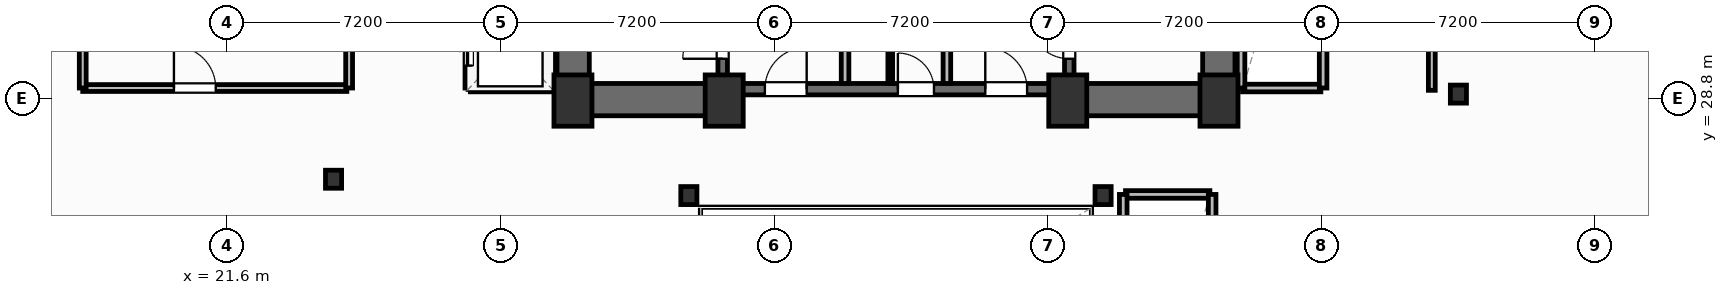
"""IFC4 building model, lengths in metres.
Left out: names, types, materials, properties, quantities, classifications, styles, units other than length and angle.
Written with IfcOpenShell. Run it as: python <this file> out.ifc"""

import sys

from ifc_helpers import new_model, si_unit, direction, frame, frame_2d, origin, origin_2d, place, context, subcontext, project, spatial, rectangle, i_section, extrude, element, fill, save


model = new_model("IFC4")
c1 = context("Model", 3, precision=1e-05, world=origin(), true_north=direction((0.0, 1.0)))
c2 = subcontext(c1, "Body", "Model", "MODEL_VIEW")
j1 = project(units=[si_unit("LENGTHUNIT", "METRE"), si_unit("PLANEANGLEUNIT", "RADIAN")], contexts=[c1])
p1 = place(None, origin())
s1 = spatial("IfcSite", under=j1, at=p1, CompositionType="ELEMENT")
p2 = place(p1, origin())
s2 = spatial("IfcBuilding", under=s1, at=p2, CompositionType="ELEMENT")
p3 = place(p2, frame((0.0, 0.0, 71.4)))
s3 = spatial("IfcBuildingStorey", under=s2, at=p3, CompositionType="ELEMENT", Elevation=71.4)
for number, where, z_axis, x_axis in (
    (1, (30.7, 28.75, 0.0), (0.0, 0.0, 1.0), (1.0, 0.0, 0.0)),
    (2, (34.68, 28.75, 0.0), (0.0, 0.0, 1.0), (1.0, 0.0, 0.0)),
    (3, (43.72, 28.75, 0.0), (0.0, 0.0, 1.0), (1.0, 0.0, 0.0)),
    (4, (47.7, 28.75, 0.0), (0.0, 0.0, 1.0), (1.0, 0.0, 0.0)),
):
    element("IfcColumn", number, at=place(p3, frame(where, z_axis=z_axis, x_axis=x_axis)), inside=s3, PredefinedType="COLUMN", context=c2, shape_type="SweptSolid", body=[
        extrude(rectangle(XDim=1.0, YDim=1.35, at=origin_2d()), origin(), (0.0, 0.0, 1.0), 4.8),
    ])
for number, where, z_axis, x_axis in (
    (5, (33.75, 26.25, 0.0), (0.0, 0.0, 1.0), (1.0, 0.0, 0.0)),
    (6, (44.65, 26.25, 0.0), (0.0, 0.0, 1.0), (1.0, 0.0, 0.0)),
    (7, (24.4, 26.68, 0.0), (0.0, 0.0, 1.0), (1.0, 0.0, 0.0)),
    (8, (54.0, 28.92, 0.0), (0.0, 0.0, 1.0), (1.0, 0.0, 0.0)),
):
    element("IfcColumn", number, at=place(p3, frame(where, z_axis=z_axis, x_axis=x_axis)), inside=s3, PredefinedType="COLUMN", context=c2, shape_type="SweptSolid", body=[
        extrude(i_section(OverallWidth=0.424, OverallDepth=0.474, WebThickness=0.048, FlangeThickness=0.077, FilletRadius=0.025, at=origin_2d()), origin(), (0.0, 0.0, 1.0), 4.8),
    ])
for number, where, z_axis, x_axis in (
    (9, (30.705, 29.2, 0.0), (0.0, 0.0, 1.0), (0.0, 1.0, 0.0)),
    (10, (47.695, 29.2, 0.0), (0.0, 0.0, 1.0), (0.0, 1.0, 0.0)),
):
    element("IfcWall", number, at=place(p3, frame(where, z_axis=z_axis, x_axis=x_axis)), inside=s3, PredefinedType="SHEAR", context=c2, shape_type="SweptSolid", body=[
        extrude(rectangle(XDim=9.22, YDim=0.85, at=frame_2d((4.61, 0.0))), origin(), (0.0, 0.0, 1.0), 4.55),
    ])
for number, where, z_axis, x_axis in (
    (11, (30.28, 28.775, 0.0), (0.0, 0.0, 1.0), (1.0, 0.0, 0.0)),
    (12, (43.6, 28.775, 0.0), (0.0, 0.0, 1.0), (1.0, 0.0, 0.0)),
):
    element("IfcWall", number, at=place(p3, frame(where, z_axis=z_axis, x_axis=x_axis)), inside=s3, PredefinedType="SHEAR", context=c2, shape_type="SweptSolid", body=[
        extrude(rectangle(XDim=4.52, YDim=0.85, at=frame_2d((2.26, 0.0))), origin(), (0.0, 0.0, 1.0), 4.55),
    ])
p4 = place(p3, frame((34.8, 29.05, 0.0), z_axis=(0.0, 0.0, 1.0), x_axis=(1.0, 0.0, 0.0)))
e13 = element("IfcWall", 13, at=p4, inside=s3, PredefinedType="SHEAR", context=c2, shape_type="SweptSolid", body=[
    extrude(rectangle(XDim=8.8, YDim=0.3, at=frame_2d((4.4, 0.0))), origin(), (0.0, 0.0, 1.0), 4.55),
])
p5 = place(p4, frame((0.95, 0.0, 0.0)))
e14 = element("IfcOpeningElement", 14, at=p5, cuts=e13, PredefinedType="OPENING", context=c2, shape_type="SweptSolid", body=[
    extrude(rectangle(XDim=1.1, YDim=2.15, at=frame_2d((0.55, 1.075))), frame((0.0, 0.16, 0.0), z_axis=(0.0, -1.0, 0.0), x_axis=(1.0, 0.0, 0.0)), (0.0, 0.0, 1.0), 0.32),
])
p6 = place(p4, frame((6.75, 0.0, 0.0)))
e15 = element("IfcOpeningElement", 15, at=p6, cuts=e13, PredefinedType="OPENING", context=c2, shape_type="SweptSolid", body=[
    extrude(rectangle(XDim=1.1, YDim=2.15, at=frame_2d((0.55, 1.075))), frame((0.0, 0.16, 0.0), z_axis=(0.0, -1.0, 0.0), x_axis=(1.0, 0.0, 0.0)), (0.0, 0.0, 1.0), 0.32),
])
p7 = place(p4, frame((4.45, 0.0, 0.0)))
e16 = element("IfcOpeningElement", 16, at=p7, cuts=e13, PredefinedType="OPENING", context=c2, shape_type="SweptSolid", body=[
    extrude(rectangle(XDim=0.95, YDim=2.15, at=frame_2d((0.475, 1.075))), frame((0.0, 0.16, 0.0), z_axis=(0.0, -1.0, 0.0), x_axis=(1.0, 0.0, 0.0)), (0.0, 0.0, 1.0), 0.32),
])
p8 = place(p3, frame((34.64, 29.2, 0.0), z_axis=(0.0, 0.0, 1.0), x_axis=(0.0, 1.0, 0.0)))
e17 = element("IfcWall", 17, at=p8, inside=s3, PredefinedType="SHEAR", context=c2, shape_type="SweptSolid", body=[
    extrude(rectangle(XDim=9.22, YDim=0.25, at=frame_2d((4.61, 0.0))), origin(), (0.0, 0.0, 1.0), 4.55),
])
p9 = place(p8, frame((0.65, 0.0, 0.0)))
e18 = element("IfcOpeningElement", 18, at=p9, cuts=e17, PredefinedType="OPENING", context=c2, shape_type="SweptSolid", body=[
    extrude(rectangle(XDim=1.05, YDim=2.15, at=frame_2d((0.525, 1.075))), frame((0.0, 0.135, 0.0), z_axis=(0.0, -1.0, 0.0), x_axis=(1.0, 0.0, 0.0)), (0.0, 0.0, 1.0), 0.27),
])
p10 = place(p3, frame((43.76, 29.2, 0.0), z_axis=(0.0, 0.0, 1.0), x_axis=(0.0, 1.0, 0.0)))
e19 = element("IfcWall", 19, at=p10, inside=s3, PredefinedType="SHEAR", context=c2, shape_type="SweptSolid", body=[
    extrude(rectangle(XDim=9.22, YDim=0.25, at=frame_2d((4.61, 0.0))), origin(), (0.0, 0.0, 1.0), 4.55),
])
p11 = place(p10, frame((0.65, 0.0, 0.0)))
e20 = element("IfcOpeningElement", 20, at=p11, cuts=e19, PredefinedType="OPENING", context=c2, shape_type="SweptSolid", body=[
    extrude(rectangle(XDim=1.05, YDim=2.15, at=frame_2d((0.525, 1.075))), frame((0.0, 0.135, 0.0), z_axis=(0.0, -1.0, 0.0), x_axis=(1.0, 0.0, 0.0)), (0.0, 0.0, 1.0), 0.27),
])
p12 = place(p3, frame((17.8, 29.08, 0.0), z_axis=(0.0, 0.0, 1.0), x_axis=(1.0, 0.0, 0.0)))
e21 = element("IfcWall", 21, at=p12, inside=s3, PredefinedType="PARTITIONING", context=c2, shape_type="SweptSolid", body=[
    extrude(rectangle(XDim=6.95, YDim=0.18, at=frame_2d((3.475, 0.0))), origin(), (0.0, 0.0, 1.0), 4.55),
])
p13 = place(p12, frame((2.4, 0.0, 0.0)))
e22 = element("IfcOpeningElement", 22, at=p13, cuts=e21, PredefinedType="OPENING", context=c2, shape_type="SweptSolid", body=[
    extrude(rectangle(XDim=1.1, YDim=2.15, at=frame_2d((0.55, 1.075))), frame((0.0, 0.1, 0.0), z_axis=(0.0, -1.0, 0.0), x_axis=(1.0, 0.0, 0.0)), (0.0, 0.0, 1.0), 0.2),
])
p14 = place(p3, frame((17.8, 29.08, 0.0), z_axis=(0.0, 0.0, 1.0), x_axis=(0.0, 1.0, 0.0)))
e23 = element("IfcWall", 23, at=p14, inside=s3, PredefinedType="PARTITIONING", context=c2, shape_type="SweptSolid", body=[
    extrude(rectangle(XDim=7.6, YDim=0.18, at=frame_2d((3.8, 0.0))), origin(), (0.0, 0.0, 1.0), 4.55),
])
p15 = place(p3, frame((24.81, 29.08, 0.0), z_axis=(0.0, 0.0, 1.0), x_axis=(0.0, 1.0, 0.0)))
e24 = element("IfcWall", 24, at=p15, inside=s3, PredefinedType="PARTITIONING", context=c2, shape_type="SweptSolid", body=[
    extrude(rectangle(XDim=7.6, YDim=0.18, at=frame_2d((3.8, 0.0))), origin(), (0.0, 0.0, 1.0), 4.55),
])
p16 = place(p15, frame((5.8, 0.0, 0.0)))
e25 = element("IfcOpeningElement", 25, at=p16, cuts=e24, PredefinedType="OPENING", context=c2, shape_type="SweptSolid", body=[
    extrude(rectangle(XDim=1.1, YDim=2.15, at=frame_2d((0.55, 1.075))), frame((0.0, 0.1, 0.0), z_axis=(0.0, -1.0, 0.0), x_axis=(1.0, 0.0, 0.0)), (0.0, 0.0, 1.0), 0.2),
])
p17 = place(p3, frame((53.3, 29.02, 0.0), z_axis=(0.0, 0.0, 1.0), x_axis=(0.0, 1.0, 0.0)))
e26 = element("IfcWall", 26, at=p17, inside=s3, PredefinedType="PARTITIONING", context=c2, shape_type="SweptSolid", body=[
    extrude(rectangle(XDim=10.28, YDim=0.18, at=frame_2d((5.14, 0.0))), origin(), (0.0, 0.0, 1.0), 4.55),
])
for number, where, z_axis, x_axis in (
    (27, (37.86, 29.2, 0.0), (0.0, 0.0, 1.0), (0.0, 1.0, 0.0)),
    (28, (40.54, 29.2, 0.0), (0.0, 0.0, 1.0), (0.0, 1.0, 0.0)),
):
    element("IfcWall", number, at=place(p3, frame(where, z_axis=z_axis, x_axis=x_axis)), inside=s3, PredefinedType="PARTITIONING", context=c2, shape_type="SweptSolid", body=[
        extrude(rectangle(XDim=5.18, YDim=0.2, at=frame_2d((2.59, 0.0))), origin(), (0.0, 0.0, 1.0), 4.55),
    ])
p18 = place(p3, frame((39.05, 29.2, 0.0), z_axis=(0.0, 0.0, 1.0), x_axis=(0.0, 1.0, 0.0)))
e29 = element("IfcWall", 29, at=p18, inside=s3, PredefinedType="PARTITIONING", context=c2, shape_type="SweptSolid", body=[
    extrude(rectangle(XDim=5.22, YDim=0.125, at=frame_2d((2.61, 0.0))), origin(), (0.0, 0.0, 1.0), 4.55),
])
p19 = place(p18, frame((2.05, 0.0, 0.0)))
e30 = element("IfcOpeningElement", 30, at=p19, cuts=e29, PredefinedType="OPENING", context=c2, shape_type="SweptSolid", body=[
    extrude(rectangle(XDim=0.85, YDim=2.05, at=frame_2d((0.425, 1.025))), frame((0.0, 0.073, 0.0), z_axis=(0.0, -1.0, 0.0), x_axis=(1.0, 0.0, 0.0)), (0.0, 0.0, 1.0), 0.145),
])
p20 = place(p3, frame((28.0, 29.08, 0.0), z_axis=(0.0, 0.0, 1.0), x_axis=(1.0, 0.0, 0.0)))
e31 = element("IfcWall", 31, at=p20, inside=s3, PredefinedType="PARTITIONING", context=c2, shape_type="SweptSolid", body=[
    extrude(rectangle(XDim=2.1, YDim=0.2, at=frame_2d((1.05, 0.0))), origin(), (0.0, 0.0, 1.0), 4.55),
])
p21 = place(p3, frame((30.12, 29.08, 0.0), z_axis=(0.0, 0.0, 1.0), x_axis=(0.0, 1.0, 0.0)))
e32 = element("IfcWall", 32, at=p21, inside=s3, PredefinedType="PARTITIONING", context=c2, shape_type="SweptSolid", body=[
    extrude(rectangle(XDim=6.89, YDim=0.2, at=frame_2d((3.445, 0.0))), origin(), (0.0, 0.0, 1.0), 4.55),
])
p22 = place(p3, frame((27.96, 29.08, 0.0), z_axis=(0.0, 0.0, 1.0), x_axis=(0.0, 1.0, 0.0)))
e33 = element("IfcWall", 33, at=p22, inside=s3, PredefinedType="PARTITIONING", context=c2, shape_type="SweptSolid", body=[
    extrude(rectangle(XDim=6.89, YDim=0.2, at=frame_2d((3.445, 0.0))), origin(), (0.0, 0.0, 1.0), 4.55),
])
p23 = place(p22, frame((0.59, 0.0, 0.0)))
e34 = element("IfcOpeningElement", 34, at=p23, cuts=e33, PredefinedType="OPENING", context=c2, shape_type="SweptSolid", body=[
    extrude(rectangle(XDim=1.1, YDim=2.15, at=frame_2d((0.55, 1.075))), frame((0.0, 0.11, 0.0), z_axis=(0.0, -1.0, 0.0), x_axis=(1.0, 0.0, 0.0)), (0.0, 0.0, 1.0), 0.22),
])
p24 = place(p22, frame((2.89, 0.0, 0.0)))
e35 = element("IfcOpeningElement", 35, at=p24, cuts=e33, PredefinedType="OPENING", context=c2, shape_type="SweptSolid", body=[
    extrude(rectangle(XDim=1.1, YDim=2.15, at=frame_2d((0.55, 1.075))), frame((0.0, 0.11, 0.0), z_axis=(0.0, -1.0, 0.0), x_axis=(1.0, 0.0, 0.0)), (0.0, 0.0, 1.0), 0.22),
])
p25 = place(p22, frame((5.19, 0.0, 0.0)))
e36 = element("IfcOpeningElement", 36, at=p25, cuts=e33, PredefinedType="OPENING", context=c2, shape_type="SweptSolid", body=[
    extrude(rectangle(XDim=1.1, YDim=2.15, at=frame_2d((0.55, 1.075))), frame((0.0, 0.11, 0.0), z_axis=(0.0, -1.0, 0.0), x_axis=(1.0, 0.0, 0.0)), (0.0, 0.0, 1.0), 0.22),
])
p26 = place(p3, frame((48.32, 29.08, 0.0), z_axis=(0.0, 0.0, 1.0), x_axis=(1.0, 0.0, 0.0)))
e37 = element("IfcWall", 37, at=p26, inside=s3, PredefinedType="PARTITIONING", context=c2, shape_type="SweptSolid", body=[
    extrude(rectangle(XDim=2.06, YDim=0.2, at=frame_2d((1.03, 0.0))), origin(), (0.0, 0.0, 1.0), 3.762),
])
for number, where, z_axis, x_axis in (
    (38, (48.28, 29.08, 0.0), (0.0, 0.0, 1.0), (0.0, 1.0, 0.0)),
    (39, (50.44, 29.08, 0.0), (0.0, 0.0, 1.0), (0.0, 1.0, 0.0)),
):
    element("IfcWall", number, at=place(p3, frame(where, z_axis=z_axis, x_axis=x_axis)), inside=s3, PredefinedType="PARTITIONING", context=c2, shape_type="SweptSolid", body=[
        extrude(rectangle(XDim=6.89, YDim=0.2, at=frame_2d((3.445, 0.0))), origin(), (0.0, 0.0, 1.0), 4.55),
    ])
p27 = place(p3, frame((45.24, 26.28, 0.0), z_axis=(0.0, 0.0, 1.0), x_axis=(1.0, 0.0, 0.0)))
e40 = element("IfcWall", 40, at=p27, inside=s3, PredefinedType="PARTITIONING", context=c2, shape_type="SweptSolid", body=[
    extrude(rectangle(XDim=2.22, YDim=0.2, at=frame_2d((1.11, 0.0))), origin(), (0.0, 0.0, 1.0), 4.55),
])
for number, where, z_axis, x_axis in (
    (41, (45.18, 19.38, 0.0), (0.0, 0.0, 1.0), (0.0, 1.0, 0.0)),
    (42, (47.52, 19.38, 0.0), (0.0, 0.0, 1.0), (0.0, 1.0, 0.0)),
):
    element("IfcWall", number, at=place(p3, frame(where, z_axis=z_axis, x_axis=x_axis)), inside=s3, PredefinedType="PARTITIONING", context=c2, shape_type="SweptSolid", body=[
        extrude(rectangle(XDim=6.9, YDim=0.2, at=frame_2d((3.45, 0.0))), origin(), (0.0, 0.0, 1.0), 4.55),
    ])
p28 = place(p13, origin())
e43 = element("IfcDoor", 43, at=p28, inside=s3, OperationType="SINGLE_SWING_LEFT", PredefinedType="DOOR", context=c2, shape_type="SweptSolid", body=[
    extrude(rectangle(XDim=1.1, YDim=2.15, at=frame_2d((0.55, 1.075))), frame((0.0, 0.025, 0.0), z_axis=(0.0, -1.0, 0.0), x_axis=(1.0, 0.0, 0.0)), (0.0, 0.0, 1.0), 0.05),
])
fill(e22, e43)
p29 = place(p9, origin())
e44 = element("IfcDoor", 44, at=p29, inside=s3, OperationType="SINGLE_SWING_LEFT", PredefinedType="DOOR", context=c2, shape_type="SweptSolid", body=[
    extrude(rectangle(XDim=1.05, YDim=2.15, at=frame_2d((0.525, 1.075))), frame((0.0, 0.025, 0.0), z_axis=(0.0, -1.0, 0.0), x_axis=(1.0, 0.0, 0.0)), (0.0, 0.0, 1.0), 0.05),
])
fill(e18, e44)
p30 = place(p11, origin())
e45 = element("IfcDoor", 45, at=p30, inside=s3, OperationType="SINGLE_SWING_RIGHT", PredefinedType="DOOR", context=c2, shape_type="SweptSolid", body=[
    extrude(rectangle(XDim=1.05, YDim=2.15, at=frame_2d((0.525, 1.075))), frame((0.0, 0.025, 0.0), z_axis=(0.0, -1.0, 0.0), x_axis=(1.0, 0.0, 0.0)), (0.0, 0.0, 1.0), 0.05),
])
fill(e20, e45)
p31 = place(p5, origin())
e46 = element("IfcDoor", 46, at=p31, inside=s3, OperationType="SINGLE_SWING_RIGHT", PredefinedType="DOOR", context=c2, shape_type="SweptSolid", body=[
    extrude(rectangle(XDim=1.1, YDim=2.15, at=frame_2d((0.55, 1.075))), frame((0.0, 0.025, 0.0), z_axis=(0.0, -1.0, 0.0), x_axis=(1.0, 0.0, 0.0)), (0.0, 0.0, 1.0), 0.05),
])
fill(e14, e46)
p32 = place(p6, origin())
e47 = element("IfcDoor", 47, at=p32, inside=s3, OperationType="SINGLE_SWING_LEFT", PredefinedType="DOOR", context=c2, shape_type="SweptSolid", body=[
    extrude(rectangle(XDim=1.1, YDim=2.15, at=frame_2d((0.55, 1.075))), frame((0.0, 0.025, 0.0), z_axis=(0.0, -1.0, 0.0), x_axis=(1.0, 0.0, 0.0)), (0.0, 0.0, 1.0), 0.05),
])
fill(e15, e47)
p33 = place(p7, origin())
e48 = element("IfcDoor", 48, at=p33, inside=s3, OperationType="SINGLE_SWING_LEFT", PredefinedType="DOOR", context=c2, shape_type="SweptSolid", body=[
    extrude(rectangle(XDim=0.95, YDim=2.15, at=frame_2d((0.475, 1.075))), frame((0.0, 0.025, 0.0), z_axis=(0.0, -1.0, 0.0), x_axis=(1.0, 0.0, 0.0)), (0.0, 0.0, 1.0), 0.05),
])
fill(e16, e48)
p34 = place(p23, origin())
e49 = element("IfcDoor", 49, at=p34, inside=s3, OperationType="SLIDING_TO_LEFT", PredefinedType="DOOR", context=c2, shape_type="SweptSolid", body=[
    extrude(rectangle(XDim=1.1, YDim=2.15, at=frame_2d((0.55, 1.075))), frame((0.0, 0.025, 0.0), z_axis=(0.0, -1.0, 0.0), x_axis=(1.0, 0.0, 0.0)), (0.0, 0.0, 1.0), 0.05),
])
fill(e34, e49)
save(model, sys.argv[1])
